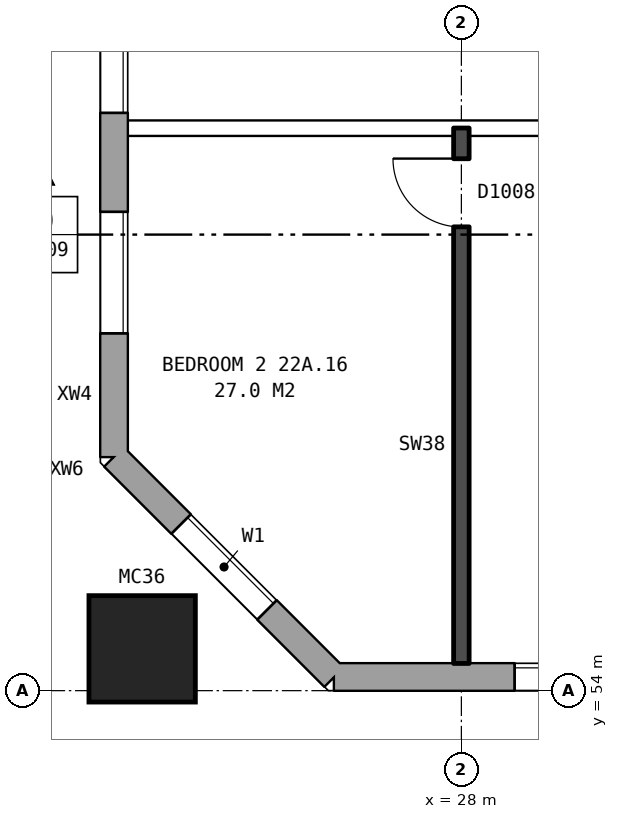
"""IFC4 building model, lengths in metres.
Left out: names, types, materials, properties, quantities, classifications, styles, units other than length and angle.
Written with IfcOpenShell. Run it as: python <this file> out.ifc"""

import sys

from ifc_helpers import new_model, si_unit, direction, frame, frame_2d, origin, origin_2d, place, context, subcontext, project, spatial, rectangle, hollow_rectangle, extrude, element, fill, save


model = new_model("IFC4")
c1 = context("Model", 3, precision=1e-05, world=origin(), true_north=direction((0.0, 1.0)))
c2 = subcontext(c1, "Body", "Model", "MODEL_VIEW")
j1 = project(units=[si_unit("LENGTHUNIT", "METRE"), si_unit("PLANEANGLEUNIT", "RADIAN")], contexts=[c1])
p1 = place(None, origin())
s1 = spatial("IfcSite", under=j1, at=p1, CompositionType="ELEMENT")
p2 = place(p1, origin())
s2 = spatial("IfcBuilding", under=s1, at=p2, CompositionType="ELEMENT")
p3 = place(p2, frame((0.0, 0.0, 80.9)))
s3 = spatial("IfcBuildingStorey", under=s2, at=p3, CompositionType="ELEMENT", Elevation=80.9)
p4 = place(p3, frame((23.8, 54.55, 0.0), z_axis=(0.0, 0.0, 1.0), x_axis=(1.0, 0.0, 0.0)))
e1 = element("IfcColumn", 1, at=p4, inside=s3, PredefinedType="COLUMN", context=c2, shape_type="SweptSolid", body=[
    extrude(hollow_rectangle(XDim=1.4, YDim=1.4, WallThickness=0.075, at=origin_2d()), origin(), (0.0, 0.0, 1.0), 3.1),
])
p5 = place(p3, frame((23.43, 57.075, 0.0), z_axis=(0.0, 0.0, 1.0), x_axis=(0.707106781187, -0.707106781187, 0.0)))
e2 = element("IfcWall", 2, at=p5, inside=s3, PredefinedType="STANDARD", context=c2, shape_type="SweptSolid", body=[
    extrude(rectangle(XDim=4.094, YDim=0.36, at=frame_2d((2.047, 0.0))), origin(), (0.0, 0.0, 1.0), 2.85),
])
p6 = place(p5, frame((1.247, 0.0, 0.8)))
e3 = element("IfcOpeningElement", 3, at=p6, cuts=e2, PredefinedType="OPENING", context=c2, shape_type="SweptSolid", body=[
    extrude(rectangle(XDim=1.6, YDim=1.8, at=frame_2d((0.8, 0.9))), frame((0.0, 0.19, 0.0), z_axis=(0.0, -1.0, 0.0), x_axis=(1.0, 0.0, 0.0)), (0.0, 0.0, 1.0), 0.38),
])
p7 = place(p3, frame((26.325, 54.18, 0.0), z_axis=(0.0, 0.0, 1.0), x_axis=(1.0, 0.0, 0.0)))
e4 = element("IfcWall", 4, at=p7, inside=s3, PredefinedType="STANDARD", context=c2, shape_type="SweptSolid", body=[
    extrude(rectangle(XDim=46.601, YDim=0.36, at=frame_2d((23.3, 0.0))), origin(), (0.0, 0.0, 1.0), 2.85),
])
p8 = place(p7, frame((2.375, 0.0, 0.8)))
e5 = element("IfcOpeningElement", 5, at=p8, cuts=e4, PredefinedType="OPENING", context=c2, shape_type="SweptSolid", body=[
    extrude(rectangle(XDim=1.6, YDim=1.8, at=frame_2d((0.8, 0.9))), frame((0.0, 0.19, 0.0), z_axis=(0.0, -1.0, 0.0), x_axis=(1.0, 0.0, 0.0)), (0.0, 0.0, 1.0), 0.38),
])
p9 = place(p7, frame((5.375, 0.0, 0.8)))
e6 = element("IfcOpeningElement", 6, at=p9, cuts=e4, PredefinedType="OPENING", context=c2, shape_type="SweptSolid", body=[
    extrude(rectangle(XDim=1.6, YDim=1.8, at=frame_2d((0.8, 0.9))), frame((0.0, 0.19, 0.0), z_axis=(0.0, -1.0, 0.0), x_axis=(1.0, 0.0, 0.0)), (0.0, 0.0, 1.0), 0.38),
])
p10 = place(p7, frame((8.375, 0.0, 0.8)))
e7 = element("IfcOpeningElement", 7, at=p10, cuts=e4, PredefinedType="OPENING", context=c2, shape_type="SweptSolid", body=[
    extrude(rectangle(XDim=1.6, YDim=1.8, at=frame_2d((0.8, 0.9))), frame((0.0, 0.19, 0.0), z_axis=(0.0, -1.0, 0.0), x_axis=(1.0, 0.0, 0.0)), (0.0, 0.0, 1.0), 0.38),
])
p11 = place(p7, frame((11.375, 0.0, 0.8)))
e8 = element("IfcOpeningElement", 8, at=p11, cuts=e4, PredefinedType="OPENING", context=c2, shape_type="SweptSolid", body=[
    extrude(rectangle(XDim=1.6, YDim=1.8, at=frame_2d((0.8, 0.9))), frame((0.0, 0.19, 0.0), z_axis=(0.0, -1.0, 0.0), x_axis=(1.0, 0.0, 0.0)), (0.0, 0.0, 1.0), 0.38),
])
p12 = place(p7, frame((15.875, 0.0, 0.8)))
e9 = element("IfcOpeningElement", 9, at=p12, cuts=e4, PredefinedType="OPENING", context=c2, shape_type="SweptSolid", body=[
    extrude(rectangle(XDim=1.2, YDim=1.2, at=frame_2d((0.6, 0.6))), frame((0.0, 0.19, 0.0), z_axis=(0.0, -1.0, 0.0), x_axis=(1.0, 0.0, 0.0)), (0.0, 0.0, 1.0), 0.38),
])
p13 = place(p7, frame((17.375, 0.0, 0.8)))
e10 = element("IfcOpeningElement", 10, at=p13, cuts=e4, PredefinedType="OPENING", context=c2, shape_type="SweptSolid", body=[
    extrude(rectangle(XDim=1.6, YDim=1.8, at=frame_2d((0.8, 0.9))), frame((0.0, 0.19, 0.0), z_axis=(0.0, -1.0, 0.0), x_axis=(1.0, 0.0, 0.0)), (0.0, 0.0, 1.0), 0.38),
])
p14 = place(p7, frame((20.375, 0.0, 0.8)))
e11 = element("IfcOpeningElement", 11, at=p14, cuts=e4, PredefinedType="OPENING", context=c2, shape_type="SweptSolid", body=[
    extrude(rectangle(XDim=1.6, YDim=1.8, at=frame_2d((0.8, 0.9))), frame((0.0, 0.19, 0.0), z_axis=(0.0, -1.0, 0.0), x_axis=(1.0, 0.0, 0.0)), (0.0, 0.0, 1.0), 0.38),
])
p15 = place(p7, frame((23.375, 0.0, 0.8)))
e12 = element("IfcOpeningElement", 12, at=p15, cuts=e4, PredefinedType="OPENING", context=c2, shape_type="SweptSolid", body=[
    extrude(rectangle(XDim=1.6, YDim=1.8, at=frame_2d((0.8, 0.9))), frame((0.0, 0.19, 0.0), z_axis=(0.0, -1.0, 0.0), x_axis=(1.0, 0.0, 0.0)), (0.0, 0.0, 1.0), 0.38),
])
p16 = place(p7, frame((26.375, 0.0, 0.8)))
e13 = element("IfcOpeningElement", 13, at=p16, cuts=e4, PredefinedType="OPENING", context=c2, shape_type="SweptSolid", body=[
    extrude(rectangle(XDim=1.6, YDim=1.8, at=frame_2d((0.8, 0.9))), frame((0.0, 0.19, 0.0), z_axis=(0.0, -1.0, 0.0), x_axis=(1.0, 0.0, 0.0)), (0.0, 0.0, 1.0), 0.38),
])
p17 = place(p7, frame((28.825, 0.0, 0.8)))
e14 = element("IfcOpeningElement", 14, at=p17, cuts=e4, PredefinedType="OPENING", context=c2, shape_type="SweptSolid", body=[
    extrude(rectangle(XDim=1.2, YDim=1.8, at=frame_2d((0.6, 0.9))), frame((0.0, 0.19, 0.0), z_axis=(0.0, -1.0, 0.0), x_axis=(1.0, 0.0, 0.0)), (0.0, 0.0, 1.0), 0.38),
])
p18 = place(p7, frame((32.375, 0.0, 1.7)))
e15 = element("IfcOpeningElement", 15, at=p18, cuts=e4, PredefinedType="OPENING", context=c2, shape_type="SweptSolid", body=[
    extrude(rectangle(XDim=0.8, YDim=0.9, at=frame_2d((0.4, 0.45))), frame((0.0, 0.19, 0.0), z_axis=(0.0, -1.0, 0.0), x_axis=(1.0, 0.0, 0.0)), (0.0, 0.0, 1.0), 0.38),
])
p19 = place(p7, frame((35.375, 0.0, 0.8)))
e16 = element("IfcOpeningElement", 16, at=p19, cuts=e4, PredefinedType="OPENING", context=c2, shape_type="SweptSolid", body=[
    extrude(rectangle(XDim=1.6, YDim=1.8, at=frame_2d((0.8, 0.9))), frame((0.0, 0.19, 0.0), z_axis=(0.0, -1.0, 0.0), x_axis=(1.0, 0.0, 0.0)), (0.0, 0.0, 1.0), 0.38),
])
p20 = place(p7, frame((38.375, 0.0, 0.8)))
e17 = element("IfcOpeningElement", 17, at=p20, cuts=e4, PredefinedType="OPENING", context=c2, shape_type="SweptSolid", body=[
    extrude(rectangle(XDim=1.6, YDim=1.8, at=frame_2d((0.8, 0.9))), frame((0.0, 0.19, 0.0), z_axis=(0.0, -1.0, 0.0), x_axis=(1.0, 0.0, 0.0)), (0.0, 0.0, 1.0), 0.38),
])
p21 = place(p7, frame((41.375, 0.0, 0.8)))
e18 = element("IfcOpeningElement", 18, at=p21, cuts=e4, PredefinedType="OPENING", context=c2, shape_type="SweptSolid", body=[
    extrude(rectangle(XDim=1.6, YDim=1.8, at=frame_2d((0.8, 0.9))), frame((0.0, 0.19, 0.0), z_axis=(0.0, -1.0, 0.0), x_axis=(1.0, 0.0, 0.0)), (0.0, 0.0, 1.0), 0.38),
])
p22 = place(p7, frame((44.375, 0.0, 0.8)))
e19 = element("IfcOpeningElement", 19, at=p22, cuts=e4, PredefinedType="OPENING", context=c2, shape_type="SweptSolid", body=[
    extrude(rectangle(XDim=1.6, YDim=1.8, at=frame_2d((0.8, 0.9))), frame((0.0, 0.19, 0.0), z_axis=(0.0, -1.0, 0.0), x_axis=(1.0, 0.0, 0.0)), (0.0, 0.0, 1.0), 0.38),
])
p23 = place(p7, frame((30.325, 0.0, 0.8)))
e20 = element("IfcOpeningElement", 20, at=p23, cuts=e4, PredefinedType="OPENING", context=c2, shape_type="SweptSolid", body=[
    extrude(rectangle(XDim=0.6, YDim=0.9, at=frame_2d((0.3, 0.45))), frame((0.0, 0.19, 0.0), z_axis=(0.0, -1.0, 0.0), x_axis=(1.0, 0.0, 0.0)), (0.0, 0.0, 1.0), 0.38),
])
p24 = place(p7, frame((33.475, 0.0, 0.8)))
e21 = element("IfcOpeningElement", 21, at=p24, cuts=e4, PredefinedType="OPENING", context=c2, shape_type="SweptSolid", body=[
    extrude(rectangle(XDim=1.0, YDim=1.8, at=frame_2d((0.5, 0.9))), frame((0.0, 0.19, 0.0), z_axis=(0.0, -1.0, 0.0), x_axis=(1.0, 0.0, 0.0)), (0.0, 0.0, 1.0), 0.38),
])
p25 = place(p3, frame((23.43, 82.925, 0.0), z_axis=(0.0, 0.0, 1.0), x_axis=(0.0, -1.0, 0.0)))
e22 = element("IfcWall", 22, at=p25, inside=s3, PredefinedType="STANDARD", context=c2, shape_type="SweptSolid", body=[
    extrude(rectangle(XDim=25.851, YDim=0.36, at=frame_2d((12.925, 0.0))), origin(), (0.0, 0.0, 1.0), 2.85),
])
p26 = place(p25, frame((1.625, 0.0, 0.8)))
e23 = element("IfcOpeningElement", 23, at=p26, cuts=e22, PredefinedType="OPENING", context=c2, shape_type="SweptSolid", body=[
    extrude(rectangle(XDim=1.6, YDim=1.8, at=frame_2d((0.8, 0.9))), frame((0.0, 0.19, 0.0), z_axis=(0.0, -1.0, 0.0), x_axis=(1.0, 0.0, 0.0)), (0.0, 0.0, 1.0), 0.38),
])
p27 = place(p25, frame((4.525, 0.0, 0.8)))
e24 = element("IfcOpeningElement", 24, at=p27, cuts=e22, PredefinedType="OPENING", context=c2, shape_type="SweptSolid", body=[
    extrude(rectangle(XDim=1.2, YDim=1.8, at=frame_2d((0.6, 0.9))), frame((0.0, 0.19, 0.0), z_axis=(0.0, -1.0, 0.0), x_axis=(1.0, 0.0, 0.0)), (0.0, 0.0, 1.0), 0.38),
])
p28 = place(p25, frame((6.025, 0.0, 0.8)))
e25 = element("IfcOpeningElement", 25, at=p28, cuts=e22, PredefinedType="OPENING", context=c2, shape_type="SweptSolid", body=[
    extrude(rectangle(XDim=1.0, YDim=0.9, at=frame_2d((0.5, 0.45))), frame((0.0, 0.19, 0.0), z_axis=(0.0, -1.0, 0.0), x_axis=(1.0, 0.0, 0.0)), (0.0, 0.0, 1.0), 0.38),
])
p29 = place(p25, frame((10.625, 0.0, 0.8)))
e26 = element("IfcOpeningElement", 26, at=p29, cuts=e22, PredefinedType="OPENING", context=c2, shape_type="SweptSolid", body=[
    extrude(rectangle(XDim=1.6, YDim=1.8, at=frame_2d((0.8, 0.9))), frame((0.0, 0.19, 0.0), z_axis=(0.0, -1.0, 0.0), x_axis=(1.0, 0.0, 0.0)), (0.0, 0.0, 1.0), 0.38),
])
p30 = place(p25, frame((13.625, 0.0, 0.8)))
e27 = element("IfcOpeningElement", 27, at=p30, cuts=e22, PredefinedType="OPENING", context=c2, shape_type="SweptSolid", body=[
    extrude(rectangle(XDim=1.6, YDim=1.8, at=frame_2d((0.8, 0.9))), frame((0.0, 0.19, 0.0), z_axis=(0.0, -1.0, 0.0), x_axis=(1.0, 0.0, 0.0)), (0.0, 0.0, 1.0), 0.38),
])
p31 = place(p25, frame((8.075, 0.0, 1.7)))
e28 = element("IfcOpeningElement", 28, at=p31, cuts=e22, PredefinedType="OPENING", context=c2, shape_type="SweptSolid", body=[
    extrude(rectangle(XDim=0.8, YDim=0.9, at=frame_2d((0.4, 0.45))), frame((0.0, 0.19, 0.0), z_axis=(0.0, -1.0, 0.0), x_axis=(1.0, 0.0, 0.0)), (0.0, 0.0, 1.0), 0.38),
])
p32 = place(p25, frame((9.325, 0.0, 0.8)))
e29 = element("IfcOpeningElement", 29, at=p32, cuts=e22, PredefinedType="OPENING", context=c2, shape_type="SweptSolid", body=[
    extrude(rectangle(XDim=1.0, YDim=1.8, at=frame_2d((0.5, 0.9))), frame((0.0, 0.19, 0.0), z_axis=(0.0, -1.0, 0.0), x_axis=(1.0, 0.0, 0.0)), (0.0, 0.0, 1.0), 0.38),
])
p33 = place(p25, frame((22.625, 0.0, 0.8)))
e30 = element("IfcOpeningElement", 30, at=p33, cuts=e22, PredefinedType="OPENING", context=c2, shape_type="SweptSolid", body=[
    extrude(rectangle(XDim=1.6, YDim=1.8, at=frame_2d((0.8, 0.9))), frame((0.0, 0.19, 0.0), z_axis=(0.0, -1.0, 0.0), x_axis=(1.0, 0.0, 0.0)), (0.0, 0.0, 1.0), 0.38),
])
p34 = place(p25, frame((12.525, 0.0, 0.8)))
e31 = element("IfcOpeningElement", 31, at=p34, cuts=e22, PredefinedType="OPENING", context=c2, shape_type="SweptSolid", body=[
    extrude(rectangle(XDim=0.8, YDim=1.8, at=frame_2d((0.4, 0.9))), frame((0.0, 0.19, 0.0), z_axis=(0.0, -1.0, 0.0), x_axis=(1.0, 0.0, 0.0)), (0.0, 0.0, 1.0), 0.38),
])
p35 = place(p25, frame((15.525, 0.0, 0.8)))
e32 = element("IfcOpeningElement", 32, at=p35, cuts=e22, PredefinedType="OPENING", context=c2, shape_type="SweptSolid", body=[
    extrude(rectangle(XDim=1.0, YDim=1.8, at=frame_2d((0.5, 0.9))), frame((0.0, 0.19, 0.0), z_axis=(0.0, -1.0, 0.0), x_axis=(1.0, 0.0, 0.0)), (0.0, 0.0, 1.0), 0.38),
])
p36 = place(p25, frame((16.825, 0.0, 1.6)))
e33 = element("IfcOpeningElement", 33, at=p36, cuts=e22, PredefinedType="OPENING", context=c2, shape_type="SweptSolid", body=[
    extrude(rectangle(XDim=0.8, YDim=0.9, at=frame_2d((0.4, 0.45))), frame((0.0, 0.19, 0.0), z_axis=(0.0, -1.0, 0.0), x_axis=(1.0, 0.0, 0.0)), (0.0, 0.0, 1.0), 0.38),
])
p37 = place(p25, frame((18.825, 0.0, 0.8)))
e34 = element("IfcOpeningElement", 34, at=p37, cuts=e22, PredefinedType="OPENING", context=c2, shape_type="SweptSolid", body=[
    extrude(rectangle(XDim=1.0, YDim=0.9, at=frame_2d((0.5, 0.45))), frame((0.0, 0.19, 0.0), z_axis=(0.0, -1.0, 0.0), x_axis=(1.0, 0.0, 0.0)), (0.0, 0.0, 1.0), 0.38),
])
p38 = place(p25, frame((20.125, 0.0, 0.8)))
e35 = element("IfcOpeningElement", 35, at=p38, cuts=e22, PredefinedType="OPENING", context=c2, shape_type="SweptSolid", body=[
    extrude(rectangle(XDim=1.2, YDim=1.8, at=frame_2d((0.6, 0.9))), frame((0.0, 0.19, 0.0), z_axis=(0.0, -1.0, 0.0), x_axis=(1.0, 0.0, 0.0)), (0.0, 0.0, 1.0), 0.38),
])
p39 = place(p3, frame((23.61, 61.4, 0.0), z_axis=(0.0, 0.0, 1.0), x_axis=(1.0, 0.0, 0.0)))
e36 = element("IfcWall", 36, at=p39, inside=s3, PredefinedType="PARTITIONING", context=c2, shape_type="SweptSolid", body=[
    extrude(rectangle(XDim=22.29, YDim=0.2, at=frame_2d((11.145, 0.0))), origin(), (0.0, 0.0, 1.0), 2.85),
])
p40 = place(p39, frame((18.84, 0.0, 0.0)))
e37 = element("IfcOpeningElement", 37, at=p40, cuts=e36, PredefinedType="OPENING", context=c2, shape_type="SweptSolid", body=[
    extrude(rectangle(XDim=1.0, YDim=2.1, at=frame_2d((0.5, 1.05))), frame((0.0, 0.11, 0.0), z_axis=(0.0, -1.0, 0.0), x_axis=(1.0, 0.0, 0.0)), (0.0, 0.0, 1.0), 0.22),
])
p41 = place(p39, frame((6.89, 0.0, 0.0)))
e38 = element("IfcOpeningElement", 38, at=p41, cuts=e36, PredefinedType="OPENING", context=c2, shape_type="SweptSolid", body=[
    extrude(rectangle(XDim=1.0, YDim=2.1, at=frame_2d((0.5, 1.05))), frame((0.0, 0.11, 0.0), z_axis=(0.0, -1.0, 0.0), x_axis=(1.0, 0.0, 0.0)), (0.0, 0.0, 1.0), 0.22),
])
p42 = place(p3, frame((28.0, 54.36, 0.0), z_axis=(0.0, 0.0, 1.0), x_axis=(0.0, 1.0, 0.0)))
e39 = element("IfcWall", 39, at=p42, inside=s3, PredefinedType="SOLIDWALL", context=c2, shape_type="SweptSolid", body=[
    extrude(rectangle(XDim=7.04, YDim=0.2, at=frame_2d((3.52, 0.0))), origin(), (0.0, 0.0, 1.0), 2.85),
])
p43 = place(p42, frame((5.74, 0.0, 0.0)))
e40 = element("IfcOpeningElement", 40, at=p43, cuts=e39, PredefinedType="OPENING", context=c2, shape_type="SweptSolid", body=[
    extrude(rectangle(XDim=0.9, YDim=2.1, at=frame_2d((0.45, 1.05))), frame((0.0, 0.11, 0.0), z_axis=(0.0, -1.0, 0.0), x_axis=(1.0, 0.0, 0.0)), (0.0, 0.0, 1.0), 0.22),
])
p44 = place(p6, origin())
e41 = element("IfcWindow", 41, at=p44, inside=s3, PartitioningType="SINGLE_PANEL", PredefinedType="WINDOW", context=c2, shape_type="SweptSolid", body=[
    extrude(rectangle(XDim=1.6, YDim=1.8, at=frame_2d((0.8, 0.9))), frame((0.0, 0.15, 0.0), z_axis=(0.0, -1.0, 0.0), x_axis=(1.0, 0.0, 0.0)), (0.0, 0.0, 1.0), 0.06),
])
fill(e3, e41)
p45 = place(p8, origin())
e42 = element("IfcWindow", 42, at=p45, inside=s3, PartitioningType="SINGLE_PANEL", PredefinedType="WINDOW", context=c2, shape_type="SweptSolid", body=[
    extrude(rectangle(XDim=1.6, YDim=1.8, at=frame_2d((0.8, 0.9))), frame((0.0, 0.15, 0.0), z_axis=(0.0, -1.0, 0.0), x_axis=(1.0, 0.0, 0.0)), (0.0, 0.0, 1.0), 0.06),
])
fill(e5, e42)
p46 = place(p33, origin())
e43 = element("IfcWindow", 43, at=p46, inside=s3, PartitioningType="SINGLE_PANEL", PredefinedType="WINDOW", context=c2, shape_type="SweptSolid", body=[
    extrude(rectangle(XDim=1.6, YDim=1.8, at=frame_2d((0.8, 0.9))), frame((0.0, 0.15, 0.0), z_axis=(0.0, -1.0, 0.0), x_axis=(1.0, 0.0, 0.0)), (0.0, 0.0, 1.0), 0.06),
])
fill(e30, e43)
p47 = place(p43, origin())
e44 = element("IfcDoor", 44, at=p47, inside=s3, OperationType="SINGLE_SWING_RIGHT", PredefinedType="DOOR", context=c2, shape_type="SweptSolid", body=[
    extrude(rectangle(XDim=0.9, YDim=2.1, at=frame_2d((0.45, 1.05))), frame((0.0, 0.025, 0.0), z_axis=(0.0, -1.0, 0.0), x_axis=(1.0, 0.0, 0.0)), (0.0, 0.0, 1.0), 0.05),
])
fill(e40, e44)
p48 = place(p38, origin())
e45 = element("IfcWindow", 45, at=p48, inside=s3, PartitioningType="SINGLE_PANEL", PredefinedType="WINDOW", context=c2, shape_type="SweptSolid", body=[
    extrude(rectangle(XDim=1.2, YDim=1.8, at=frame_2d((0.6, 0.9))), frame((0.0, 0.15, 0.0), z_axis=(0.0, -1.0, 0.0), x_axis=(1.0, 0.0, 0.0)), (0.0, 0.0, 1.0), 0.06),
])
fill(e35, e45)
save(model, sys.argv[1])
